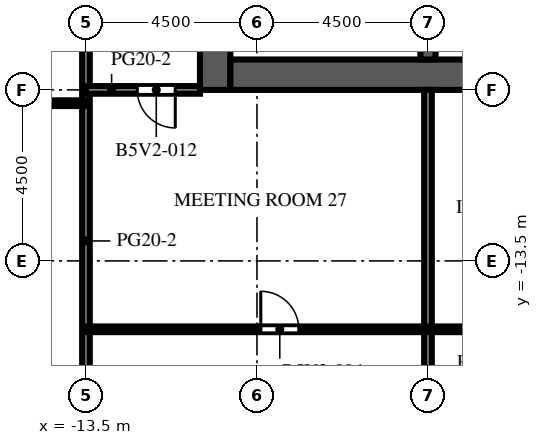
"""IFC4 building model, lengths in metres.
Left out: names, types, materials, properties, quantities, classifications, styles, units other than length and angle.
Written with IfcOpenShell. Run it as: python <this file> out.ifc"""

import sys

from ifc_helpers import new_model, si_unit, direction, frame, frame_2d, origin, place, context, subcontext, project, spatial, rectangle, extrude, element, fill, save


model = new_model("IFC4")
c1 = context("Model", 3, precision=1e-05, world=origin(), true_north=direction((0.0, 1.0)))
c2 = subcontext(c1, "Body", "Model", "MODEL_VIEW")
j1 = project(units=[si_unit("LENGTHUNIT", "METRE"), si_unit("PLANEANGLEUNIT", "RADIAN")], contexts=[c1])
p1 = place(None, origin())
s1 = spatial("IfcSite", under=j1, at=p1, CompositionType="ELEMENT")
p2 = place(p1, origin())
s2 = spatial("IfcBuilding", under=s1, at=p2, CompositionType="ELEMENT")
p3 = place(p2, frame((0.0, 0.0, 181.4)))
s3 = spatial("IfcBuildingStorey", under=s2, at=p3, CompositionType="ELEMENT", Elevation=181.4)
p4 = place(p3, frame((-10.1, -9.0, 0.0), z_axis=(0.0, 0.0, 1.0), x_axis=(0.0, 1.0, 0.0)))
e1 = element("IfcWall", 1, at=p4, inside=s3, PredefinedType="SHEAR", context=c2, shape_type="SweptSolid", body=[
    extrude(rectangle(XDim=27.5, YDim=0.8, at=frame_2d((13.75, 0.0))), origin(), (0.0, 0.0, 1.0), 4.1),
])
p5 = place(p4, frame((12.55, 0.0, 0.0)))
e2 = element("IfcOpeningElement", 2, at=p5, cuts=e1, PredefinedType="OPENING", context=c2, shape_type="SweptSolid", body=[
    extrude(rectangle(XDim=2.4, YDim=2.4, at=frame_2d((1.2, 1.2))), frame((0.0, 0.41, 0.0), z_axis=(0.0, -1.0, 0.0), x_axis=(1.0, 0.0, 0.0)), (0.0, 0.0, 1.0), 0.82),
])
p6 = place(p4, frame((6.825, 0.0, 0.0)))
e3 = element("IfcOpeningElement", 3, at=p6, cuts=e1, PredefinedType="OPENING", context=c2, shape_type="SweptSolid", body=[
    extrude(rectangle(XDim=1.2, YDim=2.1, at=frame_2d((0.6, 1.05))), frame((0.0, 0.41, 0.0), z_axis=(0.0, -1.0, 0.0), x_axis=(1.0, 0.0, 0.0)), (0.0, 0.0, 1.0), 0.82),
])
p7 = place(p4, frame((19.475, 0.0, 0.0)))
e4 = element("IfcOpeningElement", 4, at=p7, cuts=e1, PredefinedType="OPENING", context=c2, shape_type="SweptSolid", body=[
    extrude(rectangle(XDim=1.2, YDim=2.1, at=frame_2d((0.6, 1.05))), frame((0.0, 0.41, 0.0), z_axis=(0.0, -1.0, 0.0), x_axis=(1.0, 0.0, 0.0)), (0.0, 0.0, 1.0), 0.82),
])
p8 = place(p3, frame((-9.7, -8.6, 0.0), z_axis=(0.0, 0.0, 1.0), x_axis=(1.0, 0.0, 0.0)))
e5 = element("IfcWall", 5, at=p8, inside=s3, PredefinedType="SHEAR", context=c2, shape_type="SweptSolid", body=[
    extrude(rectangle(XDim=10.4, YDim=0.8, at=frame_2d((5.2, 0.0))), origin(), (0.0, 0.0, 1.0), 4.1),
])
p9 = place(p3, frame((-4.5, -8.2, 0.0), z_axis=(0.0, 0.0, 1.0), x_axis=(0.0, 1.0, 0.0)))
e6 = element("IfcWall", 6, at=p9, inside=s3, PredefinedType="SHEAR", context=c2, shape_type="SweptSolid", body=[
    extrude(rectangle(XDim=7.5, YDim=0.4, at=frame_2d((3.75, 0.0))), origin(), (0.0, 0.0, 1.0), 4.1),
])
p10 = place(p3, frame((-13.5, -26.5, 0.0), z_axis=(0.0, 0.0, 1.0), x_axis=(0.0, 1.0, 0.0)))
e7 = element("IfcWall", 7, at=p10, inside=s3, PredefinedType="PARTITIONING", context=c2, shape_type="SweptSolid", body=[
    extrude(rectangle(XDim=29.75, YDim=0.2, at=frame_2d((14.875, 0.0))), origin(), (0.0, 0.0, 1.0), 3.5),
])
p11 = place(p10, frame((27.05, 0.0, 0.0)))
e8 = element("IfcOpeningElement", 8, at=p11, cuts=e7, PredefinedType="OPENING", context=c2, shape_type="SweptSolid", body=[
    extrude(rectangle(XDim=1.0, YDim=2.1, at=frame_2d((0.5, 1.05))), frame((0.0, 0.11, 0.0), z_axis=(0.0, -1.0, 0.0), x_axis=(1.0, 0.0, 0.0)), (0.0, 0.0, 1.0), 0.22),
])
p12 = place(p3, frame((-4.5, -26.5, 0.0), z_axis=(0.0, 0.0, 1.0), x_axis=(0.0, 1.0, 0.0)))
e9 = element("IfcWall", 9, at=p12, inside=s3, PredefinedType="PARTITIONING", context=c2, shape_type="SweptSolid", body=[
    extrude(rectangle(XDim=17.5, YDim=0.2, at=frame_2d((8.75, 0.0))), origin(), (0.0, 0.0, 1.0), 3.5),
])
p13 = place(p3, frame((21.0, -15.3, 0.0), z_axis=(0.0, 0.0, 1.0), x_axis=(-1.0, 0.0, 0.0)))
e10 = element("IfcWall", 10, at=p13, inside=s3, PredefinedType="PARTITIONING", context=c2, shape_type="SweptSolid", body=[
    extrude(rectangle(XDim=34.5, YDim=0.15, at=frame_2d((17.25, 0.0))), origin(), (0.0, 0.0, 1.0), 3.5),
])
p14 = place(p13, frame((28.9, 0.0, 0.0)))
e11 = element("IfcOpeningElement", 11, at=p14, cuts=e10, PredefinedType="OPENING", context=c2, shape_type="SweptSolid", body=[
    extrude(rectangle(XDim=1.0, YDim=2.1, at=frame_2d((0.5, 1.05))), frame((0.0, 0.085, 0.0), z_axis=(0.0, -1.0, 0.0), x_axis=(1.0, 0.0, 0.0)), (0.0, 0.0, 1.0), 0.17),
])
p15 = place(p13, frame((17.15, 0.0, 0.0)))
e12 = element("IfcOpeningElement", 12, at=p15, cuts=e10, PredefinedType="OPENING", context=c2, shape_type="SweptSolid", body=[
    extrude(rectangle(XDim=1.0, YDim=2.1, at=frame_2d((0.5, 1.05))), frame((0.0, 0.085, 0.0), z_axis=(0.0, -1.0, 0.0), x_axis=(1.0, 0.0, 0.0)), (0.0, 0.0, 1.0), 0.17),
])
p16 = place(p13, frame((7.15, 0.0, 0.0)))
e13 = element("IfcOpeningElement", 13, at=p16, cuts=e10, PredefinedType="OPENING", context=c2, shape_type="SweptSolid", body=[
    extrude(rectangle(XDim=1.0, YDim=2.1, at=frame_2d((0.5, 1.05))), frame((0.0, 0.085, 0.0), z_axis=(0.0, -1.0, 0.0), x_axis=(1.0, 0.0, 0.0)), (0.0, 0.0, 1.0), 0.17),
])
p17 = place(p3, frame((-13.5, -9.35, 0.0), z_axis=(0.0, 0.0, 1.0), x_axis=(-1.0, 0.0, 0.0)))
e14 = element("IfcWall", 14, at=p17, inside=s3, PredefinedType="PARTITIONING", context=c2, shape_type="SweptSolid", body=[
    extrude(rectangle(XDim=3.9, YDim=0.15, at=frame_2d((1.95, 0.0))), origin(), (0.0, 0.0, 1.0), 3.5),
])
p18 = place(p17, frame((2.15, 0.0, 0.0)))
e15 = element("IfcOpeningElement", 15, at=p18, cuts=e14, PredefinedType="OPENING", context=c2, shape_type="SweptSolid", body=[
    extrude(rectangle(XDim=1.0, YDim=2.1, at=frame_2d((0.5, 1.05))), frame((0.0, 0.085, 0.0), z_axis=(0.0, -1.0, 0.0), x_axis=(1.0, 0.0, 0.0)), (0.0, 0.0, 1.0), 0.17),
])
p19 = place(p3, frame((-10.5, -9.0, 0.0), z_axis=(0.0, 0.0, 1.0), x_axis=(-1.0, 0.0, 0.0)))
e16 = element("IfcWall", 16, at=p19, inside=s3, PredefinedType="PARTITIONING", context=c2, shape_type="SweptSolid", body=[
    extrude(rectangle(XDim=3.0, YDim=0.2, at=frame_2d((1.5, 0.0))), origin(), (0.0, 0.0, 1.0), 3.5),
])
p20 = place(p19, frame((0.65, 0.0, 0.0)))
e17 = element("IfcOpeningElement", 17, at=p20, cuts=e16, PredefinedType="OPENING", context=c2, shape_type="SweptSolid", body=[
    extrude(rectangle(XDim=1.0, YDim=2.1, at=frame_2d((0.5, 1.05))), frame((0.0, 0.11, 0.0), z_axis=(0.0, -1.0, 0.0), x_axis=(1.0, 0.0, 0.0)), (0.0, 0.0, 1.0), 0.22),
])
p21 = place(p14, origin())
e18 = element("IfcDoor", 18, at=p21, inside=s3, OperationType="SINGLE_SWING_RIGHT", PredefinedType="DOOR", context=c2, shape_type="SweptSolid", body=[
    extrude(rectangle(XDim=1.0, YDim=2.1, at=frame_2d((0.5, 1.05))), frame((0.0, 0.025, 0.0), z_axis=(0.0, -1.0, 0.0), x_axis=(1.0, 0.0, 0.0)), (0.0, 0.0, 1.0), 0.05),
])
fill(e11, e18)
p22 = place(p20, origin())
e19 = element("IfcDoor", 19, at=p22, inside=s3, OperationType="SINGLE_SWING_LEFT", PredefinedType="DOOR", context=c2, shape_type="SweptSolid", body=[
    extrude(rectangle(XDim=1.0, YDim=2.1, at=frame_2d((0.5, 1.05))), frame((0.0, 0.025, 0.0), z_axis=(0.0, -1.0, 0.0), x_axis=(1.0, 0.0, 0.0)), (0.0, 0.0, 1.0), 0.05),
])
fill(e17, e19)
save(model, sys.argv[1])
